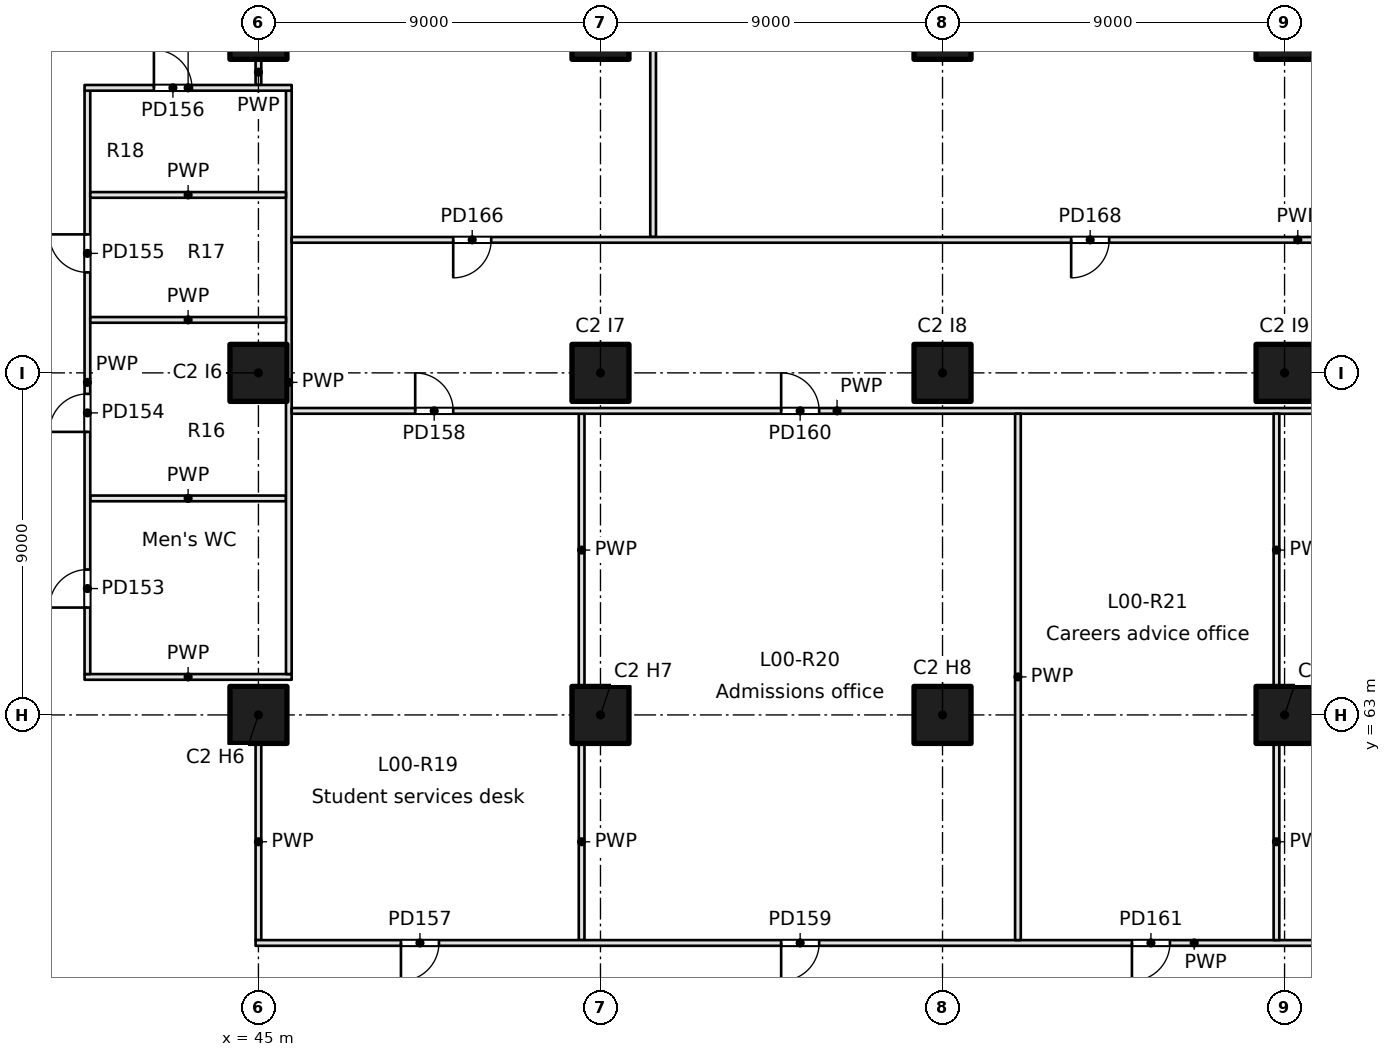
"""IFC4 building model, lengths in metres.
Left out: names, types, materials, properties, quantities, classifications, styles, units other than length and angle.
Written with IfcOpenShell. Run it as: python <this file> out.ifc"""

import sys

from ifc_helpers import new_model, si_unit, direction, frame, frame_2d, origin, origin_2d, place, context, subcontext, project, spatial, rectangle, extrude, element, fill, save


model = new_model("IFC4")
c1 = context("Model", 3, precision=1e-05, world=origin(), true_north=direction((0.0, 1.0)))
c2 = subcontext(c1, "Body", "Model", "MODEL_VIEW")
j1 = project(units=[si_unit("LENGTHUNIT", "METRE"), si_unit("PLANEANGLEUNIT", "RADIAN")], contexts=[c1])
p1 = place(None, origin())
s1 = spatial("IfcSite", under=j1, at=p1, CompositionType="ELEMENT")
p2 = place(p1, origin())
s2 = spatial("IfcBuilding", under=s1, at=p2, CompositionType="ELEMENT")
p3 = place(p2, origin())
s3 = spatial("IfcBuildingStorey", under=s2, at=p3, CompositionType="ELEMENT", Elevation=0.0)
for number, where, z_axis, x_axis in (
    (1, (45.0, 63.0, 0.0), (0.0, 0.0, 1.0), (1.0, 0.0, 0.0)),
    (2, (45.0, 72.0, 0.0), (0.0, 0.0, 1.0), (1.0, 0.0, 0.0)),
    (3, (45.0, 81.0, 0.0), (0.0, 0.0, 1.0), (1.0, 0.0, 0.0)),
    (4, (54.0, 63.0, 0.0), (0.0, 0.0, 1.0), (1.0, 0.0, 0.0)),
    (5, (54.0, 72.0, 0.0), (0.0, 0.0, 1.0), (1.0, 0.0, 0.0)),
    (6, (54.0, 81.0, 0.0), (0.0, 0.0, 1.0), (1.0, 0.0, 0.0)),
    (7, (63.0, 63.0, 0.0), (0.0, 0.0, 1.0), (1.0, 0.0, 0.0)),
    (8, (63.0, 72.0, 0.0), (0.0, 0.0, 1.0), (1.0, 0.0, 0.0)),
    (9, (63.0, 81.0, 0.0), (0.0, 0.0, 1.0), (1.0, 0.0, 0.0)),
    (10, (72.0, 63.0, 0.0), (0.0, 0.0, 1.0), (1.0, 0.0, 0.0)),
    (11, (72.0, 72.0, 0.0), (0.0, 0.0, 1.0), (1.0, 0.0, 0.0)),
    (12, (72.0, 81.0, 0.0), (0.0, 0.0, 1.0), (1.0, 0.0, 0.0)),
):
    element("IfcColumn", number, at=place(p3, frame(where, z_axis=z_axis, x_axis=x_axis)), inside=s3, PredefinedType="COLUMN", context=c2, shape_type="SweptSolid", body=[
        extrude(rectangle(XDim=1.5, YDim=1.5, at=origin_2d()), origin(), (0.0, 0.0, 1.0), 6.0),
    ])
p4 = place(p3, frame((45.0, 57.075, 0.0), z_axis=(0.0, 0.0, 1.0), x_axis=(0.0, 1.0, 0.0)))
e13 = element("IfcWall", 13, at=p4, inside=s3, PredefinedType="PARTITIONING", context=c2, shape_type="SweptSolid", body=[
    extrude(rectangle(XDim=5.175, YDim=0.15, at=frame_2d((2.587, 0.0))), origin(), (0.0, 0.0, 1.0), 5.65),
])
p5 = place(p3, frame((45.0, 79.575, 0.0), z_axis=(0.0, 0.0, 1.0), x_axis=(0.0, 1.0, 0.0)))
e14 = element("IfcWall", 14, at=p5, inside=s3, PredefinedType="PARTITIONING", context=c2, shape_type="SweptSolid", body=[
    extrude(rectangle(XDim=0.675, YDim=0.15, at=frame_2d((0.337, 0.0))), origin(), (0.0, 0.0, 1.0), 5.65),
])
p6 = place(p3, frame((40.575, 68.697, 0.0), z_axis=(0.0, 0.0, 1.0), x_axis=(1.0, 0.0, 0.0)))
e15 = element("IfcWall", 15, at=p6, inside=s3, PredefinedType="PARTITIONING", context=c2, shape_type="SweptSolid", body=[
    extrude(rectangle(XDim=5.15, YDim=0.15, at=frame_2d((2.575, 0.0))), origin(), (0.0, 0.0, 1.0), 5.65),
])
p7 = place(p3, frame((45.875, 64.0, 0.0), z_axis=(0.0, 0.0, 1.0), x_axis=(-1.0, 0.0, 0.0)))
e16 = element("IfcWall", 16, at=p7, inside=s3, PredefinedType="PARTITIONING", context=c2, shape_type="SweptSolid", body=[
    extrude(rectangle(XDim=5.45, YDim=0.15, at=frame_2d((2.725, 0.0))), origin(), (0.0, 0.0, 1.0), 5.65),
])
p8 = place(p3, frame((45.8, 79.425, 0.0), z_axis=(0.0, 0.0, 1.0), x_axis=(0.0, -1.0, 0.0)))
e17 = element("IfcWall", 17, at=p8, inside=s3, PredefinedType="PARTITIONING", context=c2, shape_type="SweptSolid", body=[
    extrude(rectangle(XDim=15.35, YDim=0.15, at=frame_2d((7.675, 0.0))), origin(), (0.0, 0.0, 1.0), 5.65),
])
p9 = place(p3, frame((40.5, 64.075, 0.0), z_axis=(0.0, 0.0, 1.0), x_axis=(0.0, 1.0, 0.0)))
e18 = element("IfcWall", 18, at=p9, inside=s3, PredefinedType="PARTITIONING", context=c2, shape_type="SweptSolid", body=[
    extrude(rectangle(XDim=15.35, YDim=0.15, at=frame_2d((7.675, 0.0))), origin(), (0.0, 0.0, 1.0), 5.65),
])
p10 = place(p9, frame((1.75, 0.0, 0.0)))
e19 = element("IfcOpeningElement", 19, at=p10, cuts=e18, PredefinedType="OPENING", context=c2, shape_type="SweptSolid", body=[
    extrude(rectangle(XDim=1.0, YDim=2.1, at=frame_2d((0.5, 1.05))), frame((0.0, 0.075, 0.0), z_axis=(0.0, -1.0, 0.0), x_axis=(1.0, 0.0, 0.0)), (0.0, 0.0, 1.0), 0.15),
])
p11 = place(p9, frame((6.372, 0.0, 0.0)))
e20 = element("IfcOpeningElement", 20, at=p11, cuts=e18, PredefinedType="OPENING", context=c2, shape_type="SweptSolid", body=[
    extrude(rectangle(XDim=1.0, YDim=2.1, at=frame_2d((0.5, 1.05))), frame((0.0, 0.075, 0.0), z_axis=(0.0, -1.0, 0.0), x_axis=(1.0, 0.0, 0.0)), (0.0, 0.0, 1.0), 0.15),
])
p12 = place(p9, frame((10.569, 0.0, 0.0)))
e21 = element("IfcOpeningElement", 21, at=p12, cuts=e18, PredefinedType="OPENING", context=c2, shape_type="SweptSolid", body=[
    extrude(rectangle(XDim=1.0, YDim=2.1, at=frame_2d((0.5, 1.05))), frame((0.0, 0.075, 0.0), z_axis=(0.0, -1.0, 0.0), x_axis=(1.0, 0.0, 0.0)), (0.0, 0.0, 1.0), 0.15),
])
for number, where, z_axis, x_axis in (
    (22, (40.575, 73.394, 0.0), (0.0, 0.0, 1.0), (1.0, 0.0, 0.0)),
    (23, (40.575, 76.682, 0.0), (0.0, 0.0, 1.0), (1.0, 0.0, 0.0)),
):
    element("IfcWall", number, at=place(p3, frame(where, z_axis=z_axis, x_axis=x_axis)), inside=s3, PredefinedType="PARTITIONING", context=c2, shape_type="SweptSolid", body=[
        extrude(rectangle(XDim=5.15, YDim=0.15, at=frame_2d((2.575, 0.0))), origin(), (0.0, 0.0, 1.0), 5.65),
    ])
p13 = place(p3, frame((40.425, 79.5, 0.0), z_axis=(0.0, 0.0, 1.0), x_axis=(1.0, 0.0, 0.0)))
e24 = element("IfcWall", 24, at=p13, inside=s3, PredefinedType="PARTITIONING", context=c2, shape_type="SweptSolid", body=[
    extrude(rectangle(XDim=5.45, YDim=0.15, at=frame_2d((2.725, 0.0))), origin(), (0.0, 0.0, 1.0), 5.65),
])
p14 = place(p13, frame((1.825, 0.0, 0.0)))
e25 = element("IfcOpeningElement", 25, at=p14, cuts=e24, PredefinedType="OPENING", context=c2, shape_type="SweptSolid", body=[
    extrude(rectangle(XDim=1.0, YDim=2.1, at=frame_2d((0.5, 1.05))), frame((0.0, 0.075, 0.0), z_axis=(0.0, -1.0, 0.0), x_axis=(1.0, 0.0, 0.0)), (0.0, 0.0, 1.0), 0.15),
])
p15 = place(p3, frame((53.504, 57.075, 0.0), z_axis=(0.0, 0.0, 1.0), x_axis=(0.0, 1.0, 0.0)))
e26 = element("IfcWall", 26, at=p15, inside=s3, PredefinedType="PARTITIONING", context=c2, shape_type="SweptSolid", body=[
    extrude(rectangle(XDim=5.175, YDim=0.15, at=frame_2d((2.587, 0.0))), origin(), (0.0, 0.0, 1.0), 5.65),
])
p16 = place(p3, frame((53.504, 63.75, 0.0), z_axis=(0.0, 0.0, 1.0), x_axis=(0.0, 1.0, 0.0)))
e27 = element("IfcWall", 27, at=p16, inside=s3, PredefinedType="PARTITIONING", context=c2, shape_type="SweptSolid", body=[
    extrude(rectangle(XDim=7.175, YDim=0.15, at=frame_2d((3.587, 0.0))), origin(), (0.0, 0.0, 1.0), 5.65),
])
p17 = place(p3, frame((94.32, 57.0, 0.0), z_axis=(0.0, 0.0, 1.0), x_axis=(-1.0, 0.0, 0.0)))
e28 = element("IfcWall", 28, at=p17, inside=s3, PredefinedType="PARTITIONING", context=c2, shape_type="SweptSolid", body=[
    extrude(rectangle(XDim=49.395, YDim=0.15, at=frame_2d((24.698, 0.0))), origin(), (0.0, 0.0, 1.0), 5.65),
])
p18 = place(p17, frame((44.57, 0.0, 0.0)))
e29 = element("IfcOpeningElement", 29, at=p18, cuts=e28, PredefinedType="OPENING", context=c2, shape_type="SweptSolid", body=[
    extrude(rectangle(XDim=1.0, YDim=2.1, at=frame_2d((0.5, 1.05))), frame((0.0, 0.075, 0.0), z_axis=(0.0, -1.0, 0.0), x_axis=(1.0, 0.0, 0.0)), (0.0, 0.0, 1.0), 0.15),
])
p19 = place(p17, frame((34.566, 0.0, 0.0)))
e30 = element("IfcOpeningElement", 30, at=p19, cuts=e28, PredefinedType="OPENING", context=c2, shape_type="SweptSolid", body=[
    extrude(rectangle(XDim=1.0, YDim=2.1, at=frame_2d((0.5, 1.05))), frame((0.0, 0.075, 0.0), z_axis=(0.0, -1.0, 0.0), x_axis=(1.0, 0.0, 0.0)), (0.0, 0.0, 1.0), 0.15),
])
p20 = place(p17, frame((25.336, 0.0, 0.0)))
e31 = element("IfcOpeningElement", 31, at=p20, cuts=e28, PredefinedType="OPENING", context=c2, shape_type="SweptSolid", body=[
    extrude(rectangle(XDim=1.0, YDim=2.1, at=frame_2d((0.5, 1.05))), frame((0.0, 0.075, 0.0), z_axis=(0.0, -1.0, 0.0), x_axis=(1.0, 0.0, 0.0)), (0.0, 0.0, 1.0), 0.15),
])
p21 = place(p17, frame((17.033, 0.0, 0.0)))
e32 = element("IfcOpeningElement", 32, at=p21, cuts=e28, PredefinedType="OPENING", context=c2, shape_type="SweptSolid", body=[
    extrude(rectangle(XDim=1.0, YDim=2.1, at=frame_2d((0.5, 1.05))), frame((0.0, 0.075, 0.0), z_axis=(0.0, -1.0, 0.0), x_axis=(1.0, 0.0, 0.0)), (0.0, 0.0, 1.0), 0.15),
])
p22 = place(p17, frame((7.078, 0.0, 0.0)))
e33 = element("IfcOpeningElement", 33, at=p22, cuts=e28, PredefinedType="OPENING", context=c2, shape_type="SweptSolid", body=[
    extrude(rectangle(XDim=1.0, YDim=2.1, at=frame_2d((0.5, 1.05))), frame((0.0, 0.075, 0.0), z_axis=(0.0, -1.0, 0.0), x_axis=(1.0, 0.0, 0.0)), (0.0, 0.0, 1.0), 0.15),
])
p23 = place(p3, frame((45.875, 71.0, 0.0), z_axis=(0.0, 0.0, 1.0), x_axis=(1.0, 0.0, 0.0)))
e34 = element("IfcWall", 34, at=p23, inside=s3, PredefinedType="PARTITIONING", context=c2, shape_type="SweptSolid", body=[
    extrude(rectangle(XDim=28.7, YDim=0.15, at=frame_2d((14.35, 0.0))), origin(), (0.0, 0.0, 1.0), 5.65),
])
p24 = place(p23, frame((3.25, 0.0, 0.0)))
e35 = element("IfcOpeningElement", 35, at=p24, cuts=e34, PredefinedType="OPENING", context=c2, shape_type="SweptSolid", body=[
    extrude(rectangle(XDim=1.0, YDim=2.1, at=frame_2d((0.5, 1.05))), frame((0.0, 0.075, 0.0), z_axis=(0.0, -1.0, 0.0), x_axis=(1.0, 0.0, 0.0)), (0.0, 0.0, 1.0), 0.15),
])
p25 = place(p23, frame((12.879, 0.0, 0.0)))
e36 = element("IfcOpeningElement", 36, at=p25, cuts=e34, PredefinedType="OPENING", context=c2, shape_type="SweptSolid", body=[
    extrude(rectangle(XDim=1.0, YDim=2.1, at=frame_2d((0.5, 1.05))), frame((0.0, 0.075, 0.0), z_axis=(0.0, -1.0, 0.0), x_axis=(1.0, 0.0, 0.0)), (0.0, 0.0, 1.0), 0.15),
])
p26 = place(p3, frame((64.984, 57.075, 0.0), z_axis=(0.0, 0.0, 1.0), x_axis=(0.0, 1.0, 0.0)))
e37 = element("IfcWall", 37, at=p26, inside=s3, PredefinedType="PARTITIONING", context=c2, shape_type="SweptSolid", body=[
    extrude(rectangle(XDim=13.85, YDim=0.15, at=frame_2d((6.925, 0.0))), origin(), (0.0, 0.0, 1.0), 5.65),
])
p27 = place(p3, frame((71.787, 57.075, 0.0), z_axis=(0.0, 0.0, 1.0), x_axis=(0.0, 1.0, 0.0)))
e38 = element("IfcWall", 38, at=p27, inside=s3, PredefinedType="PARTITIONING", context=c2, shape_type="SweptSolid", body=[
    extrude(rectangle(XDim=5.175, YDim=0.15, at=frame_2d((2.587, 0.0))), origin(), (0.0, 0.0, 1.0), 5.65),
])
p28 = place(p3, frame((71.787, 63.75, 0.0), z_axis=(0.0, 0.0, 1.0), x_axis=(0.0, 1.0, 0.0)))
e39 = element("IfcWall", 39, at=p28, inside=s3, PredefinedType="PARTITIONING", context=c2, shape_type="SweptSolid", body=[
    extrude(rectangle(XDim=7.175, YDim=0.15, at=frame_2d((3.587, 0.0))), origin(), (0.0, 0.0, 1.0), 5.65),
])
p29 = place(p3, frame((55.385, 75.575, 0.0), z_axis=(0.0, 0.0, 1.0), x_axis=(0.0, 1.0, 0.0)))
e40 = element("IfcWall", 40, at=p29, inside=s3, PredefinedType="PARTITIONING", context=c2, shape_type="SweptSolid", body=[
    extrude(rectangle(XDim=17.925, YDim=0.15, at=frame_2d((8.962, 0.0))), origin(), (0.0, 0.0, 1.0), 5.65),
])
p30 = place(p3, frame((98.82, 75.5, 0.0), z_axis=(0.0, 0.0, 1.0), x_axis=(-1.0, 0.0, 0.0)))
e41 = element("IfcWall", 41, at=p30, inside=s3, PredefinedType="PARTITIONING", context=c2, shape_type="SweptSolid", body=[
    extrude(rectangle(XDim=52.945, YDim=0.15, at=frame_2d((26.473, 0.0))), origin(), (0.0, 0.0, 1.0), 5.65),
])
p31 = place(p30, frame((47.695, 0.0, 0.0)))
e42 = element("IfcOpeningElement", 42, at=p31, cuts=e41, PredefinedType="OPENING", context=c2, shape_type="SweptSolid", body=[
    extrude(rectangle(XDim=1.0, YDim=2.1, at=frame_2d((0.5, 1.05))), frame((0.0, 0.075, 0.0), z_axis=(0.0, -1.0, 0.0), x_axis=(1.0, 0.0, 0.0)), (0.0, 0.0, 1.0), 0.15),
])
p32 = place(p30, frame((31.435, 0.0, 0.0)))
e43 = element("IfcOpeningElement", 43, at=p32, cuts=e41, PredefinedType="OPENING", context=c2, shape_type="SweptSolid", body=[
    extrude(rectangle(XDim=1.0, YDim=2.1, at=frame_2d((0.5, 1.05))), frame((0.0, 0.075, 0.0), z_axis=(0.0, -1.0, 0.0), x_axis=(1.0, 0.0, 0.0)), (0.0, 0.0, 1.0), 0.15),
])
p33 = place(p30, frame((14.839, 0.0, 0.0)))
e44 = element("IfcOpeningElement", 44, at=p33, cuts=e41, PredefinedType="OPENING", context=c2, shape_type="SweptSolid", body=[
    extrude(rectangle(XDim=1.0, YDim=2.1, at=frame_2d((0.5, 1.05))), frame((0.0, 0.075, 0.0), z_axis=(0.0, -1.0, 0.0), x_axis=(1.0, 0.0, 0.0)), (0.0, 0.0, 1.0), 0.15),
])
p34 = place(p30, frame((4.705, 0.0, 0.0)))
e45 = element("IfcOpeningElement", 45, at=p34, cuts=e41, PredefinedType="OPENING", context=c2, shape_type="SweptSolid", body=[
    extrude(rectangle(XDim=1.0, YDim=2.1, at=frame_2d((0.5, 1.05))), frame((0.0, 0.075, 0.0), z_axis=(0.0, -1.0, 0.0), x_axis=(1.0, 0.0, 0.0)), (0.0, 0.0, 1.0), 0.15),
])
p35 = place(p10, origin())
e46 = element("IfcDoor", 46, at=p35, inside=s3, OperationType="SINGLE_SWING_LEFT", PredefinedType="DOOR", context=c2, shape_type="SweptSolid", body=[
    extrude(rectangle(XDim=1.0, YDim=2.1, at=frame_2d((0.5, 1.05))), frame((0.0, 0.025, 0.0), z_axis=(0.0, -1.0, 0.0), x_axis=(1.0, 0.0, 0.0)), (0.0, 0.0, 1.0), 0.05),
])
fill(e19, e46)
p36 = place(p11, origin())
e47 = element("IfcDoor", 47, at=p36, inside=s3, OperationType="SINGLE_SWING_LEFT", PredefinedType="DOOR", context=c2, shape_type="SweptSolid", body=[
    extrude(rectangle(XDim=1.0, YDim=2.1, at=frame_2d((0.5, 1.05))), frame((0.0, 0.025, 0.0), z_axis=(0.0, -1.0, 0.0), x_axis=(1.0, 0.0, 0.0)), (0.0, 0.0, 1.0), 0.05),
])
fill(e20, e47)
p37 = place(p12, origin())
e48 = element("IfcDoor", 48, at=p37, inside=s3, OperationType="SINGLE_SWING_RIGHT", PredefinedType="DOOR", context=c2, shape_type="SweptSolid", body=[
    extrude(rectangle(XDim=1.0, YDim=2.1, at=frame_2d((0.5, 1.05))), frame((0.0, 0.025, 0.0), z_axis=(0.0, -1.0, 0.0), x_axis=(1.0, 0.0, 0.0)), (0.0, 0.0, 1.0), 0.05),
])
fill(e21, e48)
p38 = place(p14, origin())
e49 = element("IfcDoor", 49, at=p38, inside=s3, OperationType="SINGLE_SWING_LEFT", PredefinedType="DOOR", context=c2, shape_type="SweptSolid", body=[
    extrude(rectangle(XDim=1.0, YDim=2.1, at=frame_2d((0.5, 1.05))), frame((0.0, 0.025, 0.0), z_axis=(0.0, -1.0, 0.0), x_axis=(1.0, 0.0, 0.0)), (0.0, 0.0, 1.0), 0.05),
])
fill(e25, e49)
p39 = place(p18, origin())
e50 = element("IfcDoor", 50, at=p39, inside=s3, OperationType="SINGLE_SWING_RIGHT", PredefinedType="DOOR", context=c2, shape_type="SweptSolid", body=[
    extrude(rectangle(XDim=1.0, YDim=2.1, at=frame_2d((0.5, 1.05))), frame((0.0, 0.025, 0.0), z_axis=(0.0, -1.0, 0.0), x_axis=(1.0, 0.0, 0.0)), (0.0, 0.0, 1.0), 0.05),
])
fill(e29, e50)
p40 = place(p24, origin())
e51 = element("IfcDoor", 51, at=p40, inside=s3, OperationType="SINGLE_SWING_LEFT", PredefinedType="DOOR", context=c2, shape_type="SweptSolid", body=[
    extrude(rectangle(XDim=1.0, YDim=2.1, at=frame_2d((0.5, 1.05))), frame((0.0, 0.025, 0.0), z_axis=(0.0, -1.0, 0.0), x_axis=(1.0, 0.0, 0.0)), (0.0, 0.0, 1.0), 0.05),
])
fill(e35, e51)
p41 = place(p19, origin())
e52 = element("IfcDoor", 52, at=p41, inside=s3, OperationType="SINGLE_SWING_RIGHT", PredefinedType="DOOR", context=c2, shape_type="SweptSolid", body=[
    extrude(rectangle(XDim=1.0, YDim=2.1, at=frame_2d((0.5, 1.05))), frame((0.0, 0.025, 0.0), z_axis=(0.0, -1.0, 0.0), x_axis=(1.0, 0.0, 0.0)), (0.0, 0.0, 1.0), 0.05),
])
fill(e30, e52)
p42 = place(p25, origin())
e53 = element("IfcDoor", 53, at=p42, inside=s3, OperationType="SINGLE_SWING_LEFT", PredefinedType="DOOR", context=c2, shape_type="SweptSolid", body=[
    extrude(rectangle(XDim=1.0, YDim=2.1, at=frame_2d((0.5, 1.05))), frame((0.0, 0.025, 0.0), z_axis=(0.0, -1.0, 0.0), x_axis=(1.0, 0.0, 0.0)), (0.0, 0.0, 1.0), 0.05),
])
fill(e36, e53)
p43 = place(p20, origin())
e54 = element("IfcDoor", 54, at=p43, inside=s3, OperationType="SINGLE_SWING_RIGHT", PredefinedType="DOOR", context=c2, shape_type="SweptSolid", body=[
    extrude(rectangle(XDim=1.0, YDim=2.1, at=frame_2d((0.5, 1.05))), frame((0.0, 0.025, 0.0), z_axis=(0.0, -1.0, 0.0), x_axis=(1.0, 0.0, 0.0)), (0.0, 0.0, 1.0), 0.05),
])
fill(e31, e54)
p44 = place(p31, origin())
e55 = element("IfcDoor", 55, at=p44, inside=s3, OperationType="SINGLE_SWING_RIGHT", PredefinedType="DOOR", context=c2, shape_type="SweptSolid", body=[
    extrude(rectangle(XDim=1.0, YDim=2.1, at=frame_2d((0.5, 1.05))), frame((0.0, 0.025, 0.0), z_axis=(0.0, -1.0, 0.0), x_axis=(1.0, 0.0, 0.0)), (0.0, 0.0, 1.0), 0.05),
])
fill(e42, e55)
p45 = place(p32, origin())
e56 = element("IfcDoor", 56, at=p45, inside=s3, OperationType="SINGLE_SWING_RIGHT", PredefinedType="DOOR", context=c2, shape_type="SweptSolid", body=[
    extrude(rectangle(XDim=1.0, YDim=2.1, at=frame_2d((0.5, 1.05))), frame((0.0, 0.025, 0.0), z_axis=(0.0, -1.0, 0.0), x_axis=(1.0, 0.0, 0.0)), (0.0, 0.0, 1.0), 0.05),
])
fill(e43, e56)
save(model, sys.argv[1])
